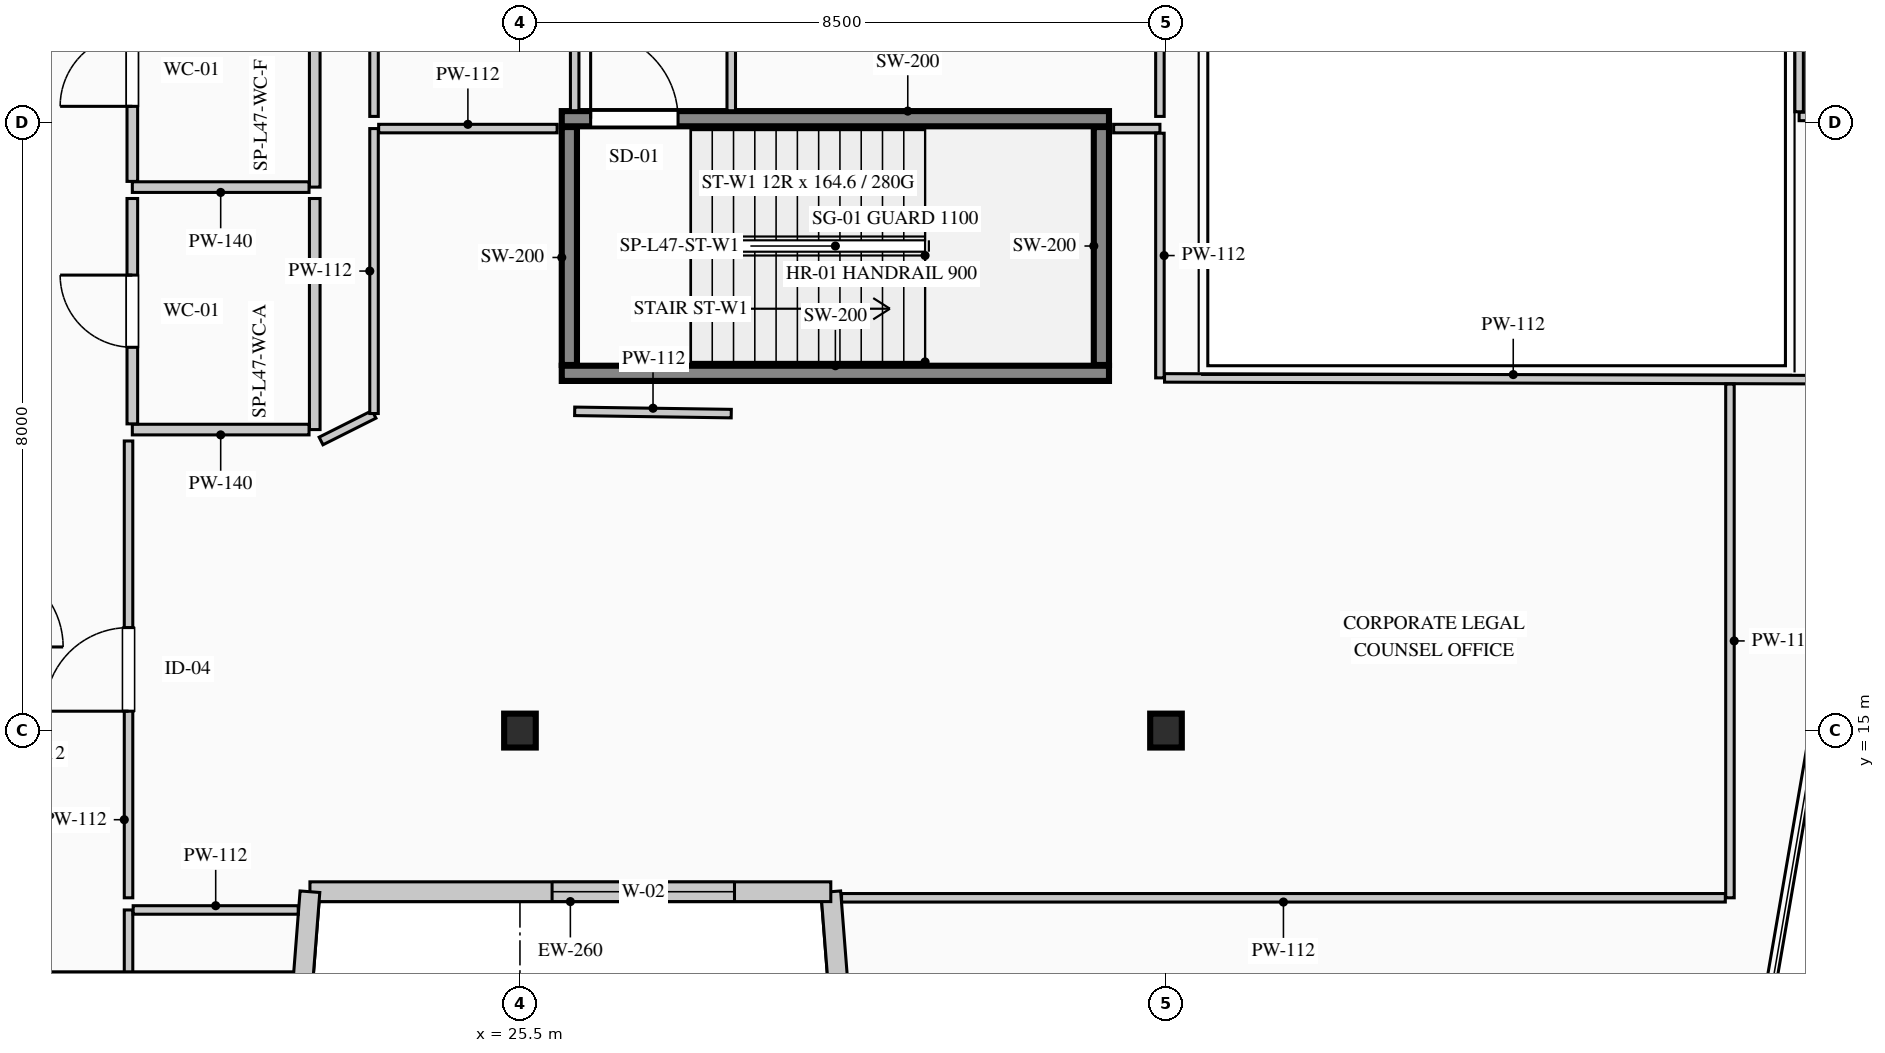
"""IFC4 building model, lengths in metres.
Left out: names, types, materials, properties, quantities, classifications, styles, units other than length and angle.
Written with IfcOpenShell. Run it as: python <this file> out.ifc"""

import sys

from ifc_helpers import new_model, si_unit, direction, frame, frame_2d, origin, origin_2d, place, context, subcontext, project, spatial, rectangle, i_section, extrude, element, fill, save


model = new_model("IFC4")
c1 = context("Model", 3, precision=1e-05, world=origin(), true_north=direction((0.0, 1.0)))
c2 = subcontext(c1, "Body", "Model", "MODEL_VIEW")
j1 = project(units=[si_unit("LENGTHUNIT", "METRE"), si_unit("PLANEANGLEUNIT", "RADIAN")], contexts=[c1])
p1 = place(None, origin())
s1 = spatial("IfcSite", under=j1, at=p1, CompositionType="ELEMENT")
p2 = place(p1, origin())
s2 = spatial("IfcBuilding", under=s1, at=p2, CompositionType="ELEMENT")
p3 = place(p2, frame((0.0, 0.0, 199.55)))
s3 = spatial("IfcBuildingStorey", under=s2, at=p3, CompositionType="ELEMENT", Elevation=199.55)
p4 = place(p3, frame((26.05, 19.7, 0.0), z_axis=(0.0, 0.0, 1.0), x_axis=(1.0, 0.0, 0.0)))
e1 = element("IfcWall", 1, at=p4, inside=s3, PredefinedType="SHEAR", context=c2, shape_type="SweptSolid", body=[
    extrude(rectangle(XDim=7.2, YDim=0.2, at=frame_2d((3.6, 0.0))), origin(), (0.0, 0.0, 1.0), 3.95),
])
p5 = place(p3, frame((26.05, 23.05, 0.0), z_axis=(0.0, 0.0, 1.0), x_axis=(1.0, 0.0, 0.0)))
e2 = element("IfcWall", 2, at=p5, inside=s3, PredefinedType="SHEAR", context=c2, shape_type="SweptSolid", body=[
    extrude(rectangle(XDim=7.2, YDim=0.2, at=frame_2d((3.6, 0.0))), origin(), (0.0, 0.0, 1.0), 3.95),
])
p6 = place(p5, frame((0.38, 0.0, 0.0)))
e3 = element("IfcOpeningElement", 3, at=p6, cuts=e2, PredefinedType="OPENING", context=c2, shape_type="SweptSolid", body=[
    extrude(rectangle(XDim=1.15, YDim=2.2, at=frame_2d((0.575, 1.1))), frame((0.0, 0.11, 0.0), z_axis=(0.0, -1.0, 0.0), x_axis=(1.0, 0.0, 0.0)), (0.0, 0.0, 1.0), 0.22),
])
for number, where, z_axis, x_axis in (
    (4, (26.15, 19.81, 0.0), (0.0, 0.0, 1.0), (0.0, 1.0, 0.0)),
    (5, (33.15, 19.81, 0.0), (0.0, 0.0, 1.0), (0.0, 1.0, 0.0)),
):
    element("IfcWall", number, at=place(p3, frame(where, z_axis=z_axis, x_axis=x_axis)), inside=s3, PredefinedType="SHEAR", context=c2, shape_type="SweptSolid", body=[
        extrude(rectangle(XDim=3.13, YDim=0.2, at=frame_2d((1.565, 0.0))), origin(), (0.0, 0.0, 1.0), 3.95),
    ])
for number, where, z_axis, x_axis in (
    (6, (25.5, 15.0, 0.0), (0.0, 0.0, 1.0), (1.0, 0.0, 0.0)),
    (7, (34.0, 15.0, 0.0), (0.0, 0.0, 1.0), (1.0, 0.0, 0.0)),
):
    element("IfcColumn", number, at=place(p3, frame(where, z_axis=z_axis, x_axis=x_axis)), inside=s3, PredefinedType="COLUMN", context=c2, shape_type="SweptSolid", body=[
        extrude(i_section(OverallWidth=0.416, OverallDepth=0.446, WebThickness=0.039, FlangeThickness=0.063, FilletRadius=0.015, at=origin_2d()), origin(), (0.0, 0.0, 1.0), 3.95),
    ])
p7 = place(p3, frame((30.39, 2.63, 0.0), z_axis=(0.0, 0.0, 1.0), x_axis=(-0.077816860153, 0.996967670627, 0.0)))
e8 = element("IfcWall", 8, at=p7, inside=s3, PredefinedType="STANDARD", context=c2, shape_type="SweptSolid", body=[
    extrude(rectangle(XDim=10.281, YDim=0.26, at=frame_2d((5.141, 0.0))), origin(), (0.0, 0.0, 1.0), 3.7),
])
p8 = place(p7, frame((5.38, 0.0, 0.9)))
e9 = element("IfcOpeningElement", 9, at=p8, cuts=e8, PredefinedType="OPENING", context=c2, shape_type="SweptSolid", body=[
    extrude(rectangle(XDim=2.4, YDim=2.1, at=frame_2d((1.2, 1.05))), frame((0.0, 0.14, 0.0), z_axis=(0.0, -1.0, 0.0), x_axis=(1.0, 0.0, 0.0)), (0.0, 0.0, 1.0), 0.28),
])
p9 = place(p3, frame((29.59, 12.88, 0.0), z_axis=(0.0, 0.0, 1.0), x_axis=(-1.0, 0.0, 0.0)))
e10 = element("IfcWall", 10, at=p9, inside=s3, PredefinedType="STANDARD", context=c2, shape_type="SweptSolid", body=[
    extrude(rectangle(XDim=6.853, YDim=0.26, at=frame_2d((3.426, 0.0))), origin(), (0.0, 0.0, 1.0), 3.7),
])
p10 = place(p9, frame((1.267, 0.0, 0.9)))
e11 = element("IfcOpeningElement", 11, at=p10, cuts=e10, PredefinedType="OPENING", context=c2, shape_type="SweptSolid", body=[
    extrude(rectangle(XDim=2.4, YDim=2.1, at=frame_2d((1.2, 1.05))), frame((0.0, 0.14, 0.0), z_axis=(0.0, -1.0, 0.0), x_axis=(1.0, 0.0, 0.0)), (0.0, 0.0, 1.0), 0.28),
])
p11 = place(p3, frame((22.737, 12.88, 0.0), z_axis=(0.0, 0.0, 1.0), x_axis=(-0.077816860153, -0.996967670627, 0.0)))
e12 = element("IfcWall", 12, at=p11, inside=s3, PredefinedType="STANDARD", context=c2, shape_type="SweptSolid", body=[
    extrude(rectangle(XDim=10.281, YDim=0.26, at=frame_2d((5.141, 0.0))), origin(), (0.0, 0.0, 1.0), 3.7),
])
p12 = place(p11, frame((2.501, 0.0, 0.9)))
e13 = element("IfcOpeningElement", 13, at=p12, cuts=e12, PredefinedType="OPENING", context=c2, shape_type="SweptSolid", body=[
    extrude(rectangle(XDim=2.4, YDim=2.1, at=frame_2d((1.2, 1.05))), frame((0.0, 0.14, 0.0), z_axis=(0.0, -1.0, 0.0), x_axis=(1.0, 0.0, 0.0)), (0.0, 0.0, 1.0), 0.28),
])
p13 = place(p3, frame((22.8, 25.15, 0.0), z_axis=(0.0, 0.0, 1.0), x_axis=(0.0, -1.0, 0.0)))
e14 = element("IfcWall", 14, at=p13, inside=s3, PredefinedType="PARTITIONING", context=c2, shape_type="SweptSolid", body=[
    extrude(rectangle(XDim=3.0, YDim=0.14, at=frame_2d((1.5, 0.0))), origin(), (0.0, 0.0, 1.0), 3.285),
])
p14 = place(p3, frame((22.725, 22.15, 0.0), z_axis=(0.0, 0.0, 1.0), x_axis=(-1.0, 0.0, 0.0)))
e15 = element("IfcWall", 15, at=p14, inside=s3, PredefinedType="PARTITIONING", context=c2, shape_type="SweptSolid", body=[
    extrude(rectangle(XDim=2.325, YDim=0.14, at=frame_2d((1.163, 0.0))), origin(), (0.0, 0.0, 1.0), 3.7),
])
p15 = place(p3, frame((20.4, 22.225, 0.0), z_axis=(0.0, 0.0, 1.0), x_axis=(0.0, 1.0, 0.0)))
e16 = element("IfcWall", 16, at=p15, inside=s3, PredefinedType="PARTITIONING", context=c2, shape_type="SweptSolid", body=[
    extrude(rectangle(XDim=2.925, YDim=0.14, at=frame_2d((1.462, 0.0))), origin(), (0.0, 0.0, 1.0), 3.7),
])
p16 = place(p15, frame((0.988, 0.0, 0.0)))
e17 = element("IfcOpeningElement", 17, at=p16, cuts=e16, PredefinedType="OPENING", context=c2, shape_type="SweptSolid", body=[
    extrude(rectangle(XDim=0.95, YDim=2.15, at=frame_2d((0.475, 1.075))), frame((0.0, 0.08, 0.0), z_axis=(0.0, -1.0, 0.0), x_axis=(1.0, 0.0, 0.0)), (0.0, 0.0, 1.0), 0.16),
])
p17 = place(p3, frame((22.8, 22.0, 0.0), z_axis=(0.0, 0.0, 1.0), x_axis=(0.0, -1.0, 0.0)))
e18 = element("IfcWall", 18, at=p17, inside=s3, PredefinedType="PARTITIONING", context=c2, shape_type="SweptSolid", body=[
    extrude(rectangle(XDim=3.04, YDim=0.14, at=frame_2d((1.52, 0.0))), origin(), (0.0, 0.0, 1.0), 3.285),
])
p18 = place(p3, frame((22.725, 18.96, 0.0), z_axis=(0.0, 0.0, 1.0), x_axis=(-1.0, 0.0, 0.0)))
e19 = element("IfcWall", 19, at=p18, inside=s3, PredefinedType="PARTITIONING", context=c2, shape_type="SweptSolid", body=[
    extrude(rectangle(XDim=2.325, YDim=0.14, at=frame_2d((1.163, 0.0))), origin(), (0.0, 0.0, 1.0), 3.7),
])
p19 = place(p3, frame((20.4, 19.035, 0.0), z_axis=(0.0, 0.0, 1.0), x_axis=(0.0, 1.0, 0.0)))
e20 = element("IfcWall", 20, at=p19, inside=s3, PredefinedType="PARTITIONING", context=c2, shape_type="SweptSolid", body=[
    extrude(rectangle(XDim=2.965, YDim=0.14, at=frame_2d((1.482, 0.0))), origin(), (0.0, 0.0, 1.0), 3.7),
])
p20 = place(p19, frame((1.008, 0.0, 0.0)))
e21 = element("IfcOpeningElement", 21, at=p20, cuts=e20, PredefinedType="OPENING", context=c2, shape_type="SweptSolid", body=[
    extrude(rectangle(XDim=0.95, YDim=2.15, at=frame_2d((0.475, 1.075))), frame((0.0, 0.08, 0.0), z_axis=(0.0, -1.0, 0.0), x_axis=(1.0, 0.0, 0.0)), (0.0, 0.0, 1.0), 0.16),
])
p21 = place(p3, frame((20.35, 11.8, 0.0), z_axis=(0.0, 0.0, 1.0), x_axis=(0.0, 1.0, 0.0)))
e22 = element("IfcWall", 22, at=p21, inside=s3, PredefinedType="PARTITIONING", context=c2, shape_type="SweptSolid", body=[
    extrude(rectangle(XDim=0.84, YDim=0.112, at=frame_2d((0.42, 0.0))), origin(), (0.0, 0.0, 1.0), 3.7),
])
p22 = place(p3, frame((20.411, 12.64, 0.0), z_axis=(0.0, 0.0, 1.0), x_axis=(1.0, 0.0, 0.0)))
e23 = element("IfcWall", 23, at=p22, inside=s3, PredefinedType="PARTITIONING", context=c2, shape_type="SweptSolid", body=[
    extrude(rectangle(XDim=2.172, YDim=0.112, at=frame_2d((1.086, 0.0))), origin(), (0.0, 0.0, 1.0), 3.7),
])
p23 = place(p3, frame((13.341, 11.77, 0.0), z_axis=(0.0, 0.0, 1.0), x_axis=(1.0, 0.0, 0.0)))
e24 = element("IfcWall", 24, at=p23, inside=s3, PredefinedType="PARTITIONING", context=c2, shape_type="SweptSolid", body=[
    extrude(rectangle(XDim=9.174, YDim=0.112, at=frame_2d((4.587, 0.0))), origin(), (0.0, 0.0, 1.0), 3.7),
])
p24 = place(p23, frame((4.037, 0.0, 0.0)))
e25 = element("IfcOpeningElement", 25, at=p24, cuts=e24, PredefinedType="OPENING", context=c2, shape_type="SweptSolid", body=[
    extrude(rectangle(XDim=1.1, YDim=2.2, at=frame_2d((0.55, 1.1))), frame((0.0, 0.066, 0.0), z_axis=(0.0, -1.0, 0.0), x_axis=(1.0, 0.0, 0.0)), (0.0, 0.0, 1.0), 0.132),
])
p25 = place(p3, frame((33.311, 22.92, 0.0), z_axis=(0.0, 0.0, 1.0), x_axis=(1.0, 0.0, 0.0)))
e26 = element("IfcWall", 26, at=p25, inside=s3, PredefinedType="PARTITIONING", context=c2, shape_type="SweptSolid", body=[
    extrude(rectangle(XDim=0.609, YDim=0.112, at=frame_2d((0.305, 0.0))), origin(), (0.0, 0.0, 1.0), 3.7),
])
p26 = place(p3, frame((33.92, 22.859, 0.0), z_axis=(0.0, 0.0, 1.0), x_axis=(0.0, -1.0, 0.0)))
e27 = element("IfcWall", 27, at=p26, inside=s3, PredefinedType="PARTITIONING", context=c2, shape_type="SweptSolid", body=[
    extrude(rectangle(XDim=3.219, YDim=0.112, at=frame_2d((1.609, 0.0))), origin(), (0.0, 0.0, 1.0), 2.885),
])
p27 = place(p3, frame((33.981, 19.64, 0.0), z_axis=(0.0, 0.0, 1.0), x_axis=(0.999996388808, -0.002687447056, 0.0)))
e28 = element("IfcWall", 28, at=p27, inside=s3, PredefinedType="PARTITIONING", context=c2, shape_type="SweptSolid", body=[
    extrude(rectangle(XDim=9.175, YDim=0.112, at=frame_2d((4.588, 0.0))), origin(), (0.0, 0.0, 1.0), 3.7),
])
p28 = place(p3, frame((41.42, 19.559, 0.0), z_axis=(0.0, 0.0, 1.0), x_axis=(0.0, -1.0, 0.0)))
e29 = element("IfcWall", 29, at=p28, inside=s3, PredefinedType="PARTITIONING", context=c2, shape_type="SweptSolid", body=[
    extrude(rectangle(XDim=6.759, YDim=0.112, at=frame_2d((3.379, 0.0))), origin(), (0.0, 0.0, 1.0), 3.7),
])
p29 = place(p3, frame((41.359, 12.8, 0.0), z_axis=(0.0, 0.0, 1.0), x_axis=(-1.0, 0.0, 0.0)))
e30 = element("IfcWall", 30, at=p29, inside=s3, PredefinedType="PARTITIONING", context=c2, shape_type="SweptSolid", body=[
    extrude(rectangle(XDim=11.627, YDim=0.112, at=frame_2d((5.814, 0.0))), origin(), (0.0, 0.0, 1.0), 3.7),
])
p30 = place(p3, frame((20.35, 12.8, 0.0), z_axis=(0.0, 0.0, 1.0), x_axis=(0.0, 1.0, 0.0)))
e31 = element("IfcWall", 31, at=p30, inside=s3, PredefinedType="PARTITIONING", context=c2, shape_type="SweptSolid", body=[
    extrude(rectangle(XDim=6.01, YDim=0.112, at=frame_2d((3.005, 0.0))), origin(), (0.0, 0.0, 1.0), 3.7),
])
p31 = place(p30, frame((2.455, 0.0, 0.0)))
e32 = element("IfcOpeningElement", 32, at=p31, cuts=e31, PredefinedType="OPENING", context=c2, shape_type="SweptSolid", body=[
    extrude(rectangle(XDim=1.1, YDim=2.2, at=frame_2d((0.55, 1.1))), frame((0.0, 0.066, 0.0), z_axis=(0.0, -1.0, 0.0), x_axis=(1.0, 0.0, 0.0)), (0.0, 0.0, 1.0), 0.132),
])
p32 = place(p3, frame((22.883, 18.81, 0.0), z_axis=(0.0, 0.0, 1.0), x_axis=(0.893737436086, 0.448590453909, 0.0)))
e33 = element("IfcWall", 33, at=p32, inside=s3, PredefinedType="PARTITIONING", context=c2, shape_type="SweptSolid", body=[
    extrude(rectangle(XDim=0.78, YDim=0.112, at=frame_2d((0.39, 0.0))), origin(), (0.0, 0.0, 1.0), 3.7),
])
p33 = place(p3, frame((23.58, 19.171, 0.0), z_axis=(0.0, 0.0, 1.0), x_axis=(0.0, 1.0, 0.0)))
e34 = element("IfcWall", 34, at=p33, inside=s3, PredefinedType="PARTITIONING", context=c2, shape_type="SweptSolid", body=[
    extrude(rectangle(XDim=3.749, YDim=0.112, at=frame_2d((1.875, 0.0))), origin(), (0.0, 0.0, 1.0), 3.7),
])
p34 = place(p3, frame((23.641, 22.92, 0.0), z_axis=(0.0, 0.0, 1.0), x_axis=(1.0, 0.0, 0.0)))
e35 = element("IfcWall", 35, at=p34, inside=s3, PredefinedType="PARTITIONING", context=c2, shape_type="SweptSolid", body=[
    extrude(rectangle(XDim=2.348, YDim=0.112, at=frame_2d((1.174, 0.0))), origin(), (0.0, 0.0, 1.0), 3.7),
])
p35 = place(p3, frame((26.22, 19.2, 0.0), z_axis=(0.0, 0.0, 1.0), x_axis=(0.999893773718, -0.014575365509, 0.0)))
e36 = element("IfcWall", 36, at=p35, inside=s3, PredefinedType="PARTITIONING", context=c2, shape_type="SweptSolid", body=[
    extrude(rectangle(XDim=2.06, YDim=0.112, at=frame_2d((1.03, 0.0))), origin(), (0.0, 0.0, 1.0), 3.7),
])
p36 = place(p3, frame((23.58, 23.08, 0.0), z_axis=(0.0, 0.0, 1.0), x_axis=(0.0, 1.0, 0.0)))
e37 = element("IfcWall", 37, at=p36, inside=s3, PredefinedType="PARTITIONING", context=c2, shape_type="SweptSolid", body=[
    extrude(rectangle(XDim=5.94, YDim=0.112, at=frame_2d((2.97, 0.0))), origin(), (0.0, 0.0, 1.0), 3.7),
])
p37 = place(p3, frame((26.22, 28.959, 0.0), z_axis=(0.0, 0.0, 1.0), x_axis=(0.0, -1.0, 0.0)))
e38 = element("IfcWall", 38, at=p37, inside=s3, PredefinedType="PARTITIONING", context=c2, shape_type="SweptSolid", body=[
    extrude(rectangle(XDim=5.804, YDim=0.112, at=frame_2d((2.902, 0.0))), origin(), (0.0, 0.0, 1.0), 3.7),
])
p38 = place(p37, frame((2.352, 0.0, 0.0)))
e39 = element("IfcOpeningElement", 39, at=p38, cuts=e38, PredefinedType="OPENING", context=c2, shape_type="SweptSolid", body=[
    extrude(rectangle(XDim=1.1, YDim=2.2, at=frame_2d((0.55, 1.1))), frame((0.0, 0.066, 0.0), z_axis=(0.0, -1.0, 0.0), x_axis=(1.0, 0.0, 0.0)), (0.0, 0.0, 1.0), 0.132),
])
p39 = place(p3, frame((28.28, 23.155, 0.0), z_axis=(0.0, 0.0, 1.0), x_axis=(0.0, 1.0, 0.0)))
e40 = element("IfcWall", 40, at=p39, inside=s3, PredefinedType="PARTITIONING", context=c2, shape_type="SweptSolid", body=[
    extrude(rectangle(XDim=5.865, YDim=0.112, at=frame_2d((2.933, 0.0))), origin(), (0.0, 0.0, 1.0), 3.7),
])
p40 = place(p39, frame((2.383, 0.0, 0.0)))
e41 = element("IfcOpeningElement", 41, at=p40, cuts=e40, PredefinedType="OPENING", context=c2, shape_type="SweptSolid", body=[
    extrude(rectangle(XDim=1.1, YDim=2.2, at=frame_2d((0.55, 1.1))), frame((0.0, 0.066, 0.0), z_axis=(0.0, -1.0, 0.0), x_axis=(1.0, 0.0, 0.0)), (0.0, 0.0, 1.0), 0.132),
])
p41 = place(p3, frame((33.92, 28.959, 0.0), z_axis=(0.0, 0.0, 1.0), x_axis=(0.0, -1.0, 0.0)))
e42 = element("IfcWall", 42, at=p41, inside=s3, PredefinedType="PARTITIONING", context=c2, shape_type="SweptSolid", body=[
    extrude(rectangle(XDim=5.879, YDim=0.112, at=frame_2d((2.939, 0.0))), origin(), (0.0, 0.0, 1.0), 2.885),
])
p42 = place(p3, frame((43.697, 23.08, 0.0), z_axis=(0.0, 0.0, 1.0), x_axis=(-1.0, 0.0, 0.0)))
e43 = element("IfcWall", 43, at=p42, inside=s3, PredefinedType="PARTITIONING", context=c2, shape_type="SweptSolid", body=[
    extrude(rectangle(XDim=1.366, YDim=0.112, at=frame_2d((0.683, 0.0))), origin(), (0.0, 0.0, 1.0), 3.7),
])
p43 = place(p3, frame((42.33, 23.141, 0.0), z_axis=(0.0, 0.0, 1.0), x_axis=(0.0, 1.0, 0.0)))
e44 = element("IfcWall", 44, at=p43, inside=s3, PredefinedType="PARTITIONING", context=c2, shape_type="SweptSolid", body=[
    extrude(rectangle(XDim=5.489, YDim=0.112, at=frame_2d((2.744, 0.0))), origin(), (0.0, 0.0, 1.0), 3.7),
])
p44 = place(p10, origin())
e45 = element("IfcWindow", 45, at=p44, inside=s3, PartitioningType="DOUBLE_PANEL_VERTICAL", PredefinedType="WINDOW", context=c2, shape_type="SweptSolid", body=[
    extrude(rectangle(XDim=2.4, YDim=2.1, at=frame_2d((1.2, 1.05))), frame((0.0, 0.03, 0.0), z_axis=(0.0, -1.0, 0.0), x_axis=(1.0, 0.0, 0.0)), (0.0, 0.0, 1.0), 0.06),
])
fill(e11, e45)
p45 = place(p6, origin())
e46 = element("IfcDoor", 46, at=p45, inside=s3, OperationType="SINGLE_SWING_LEFT", PredefinedType="DOOR", context=c2, shape_type="SweptSolid", body=[
    extrude(rectangle(XDim=1.15, YDim=2.2, at=frame_2d((0.575, 1.1))), frame((0.0, 0.025, 0.0), z_axis=(0.0, -1.0, 0.0), x_axis=(1.0, 0.0, 0.0)), (0.0, 0.0, 1.0), 0.05),
])
fill(e3, e46)
p46 = place(p16, origin())
e47 = element("IfcDoor", 47, at=p46, inside=s3, OperationType="SINGLE_SWING_LEFT", PredefinedType="DOOR", context=c2, shape_type="SweptSolid", body=[
    extrude(rectangle(XDim=0.95, YDim=2.15, at=frame_2d((0.475, 1.075))), frame((0.0, 0.025, 0.0), z_axis=(0.0, -1.0, 0.0), x_axis=(1.0, 0.0, 0.0)), (0.0, 0.0, 1.0), 0.05),
])
fill(e17, e47)
p47 = place(p20, origin())
e48 = element("IfcDoor", 48, at=p47, inside=s3, OperationType="SINGLE_SWING_RIGHT", PredefinedType="DOOR", context=c2, shape_type="SweptSolid", body=[
    extrude(rectangle(XDim=0.95, YDim=2.15, at=frame_2d((0.475, 1.075))), frame((0.0, 0.025, 0.0), z_axis=(0.0, -1.0, 0.0), x_axis=(1.0, 0.0, 0.0)), (0.0, 0.0, 1.0), 0.05),
])
fill(e21, e48)
p48 = place(p31, origin())
e49 = element("IfcDoor", 49, at=p48, inside=s3, OperationType="SINGLE_SWING_LEFT", PredefinedType="DOOR", context=c2, shape_type="SweptSolid", body=[
    extrude(rectangle(XDim=1.1, YDim=2.2, at=frame_2d((0.55, 1.1))), frame((0.0, 0.025, 0.0), z_axis=(0.0, -1.0, 0.0), x_axis=(1.0, 0.0, 0.0)), (0.0, 0.0, 1.0), 0.05),
])
fill(e32, e49)
save(model, sys.argv[1])
